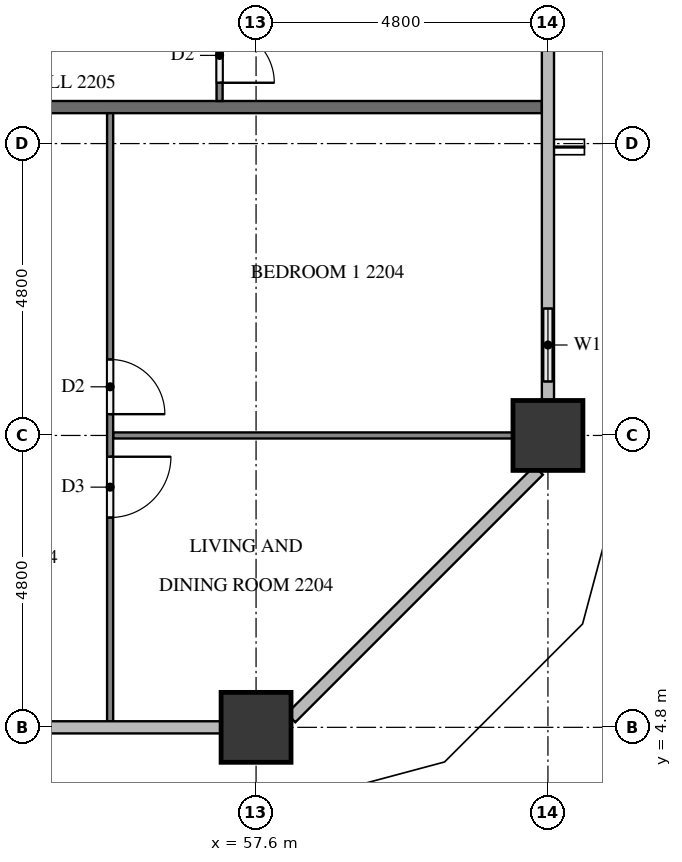
"""IFC4 building model, lengths in metres.
Left out: names, types, materials, properties, quantities, classifications, styles, units other than length and angle.
Written with IfcOpenShell. Run it as: python <this file> out.ifc"""

import sys

from ifc_helpers import new_model, si_unit, direction, frame, frame_2d, origin, origin_2d, place, context, subcontext, project, spatial, rectangle, extrude, element, fill, save


model = new_model("IFC4")
c1 = context("Model", 3, precision=1e-05, world=origin(), true_north=direction((0.0, 1.0)))
c2 = subcontext(c1, "Body", "Model", "MODEL_VIEW")
j1 = project(units=[si_unit("LENGTHUNIT", "METRE"), si_unit("PLANEANGLEUNIT", "RADIAN")], contexts=[c1])
p1 = place(None, origin())
s1 = spatial("IfcSite", under=j1, at=p1, CompositionType="ELEMENT")
p2 = place(p1, origin())
s2 = spatial("IfcBuilding", under=s1, at=p2, CompositionType="ELEMENT")
p3 = place(p2, frame((0.0, 0.0, 89.2)))
s3 = spatial("IfcBuildingStorey", under=s2, at=p3, CompositionType="ELEMENT", Elevation=89.2)
for number, where, z_axis, x_axis in (
    (1, (57.6, 4.8, 0.0), (0.0, 0.0, 1.0), (1.0, 0.0, 0.0)),
    (2, (62.4, 9.6, 0.0), (0.0, 0.0, 1.0), (1.0, 0.0, 0.0)),
):
    element("IfcColumn", number, at=place(p3, frame(where, z_axis=z_axis, x_axis=x_axis)), inside=s3, PredefinedType="COLUMN", context=c2, shape_type="SweptSolid", body=[
        extrude(rectangle(XDim=1.15, YDim=1.15, at=origin_2d()), origin(), (0.0, 0.0, 1.0), 3.2),
    ])
p4 = place(p3, frame((62.4, 10.175, 0.0), z_axis=(0.0, 0.0, 1.0), x_axis=(0.0, 1.0, 0.0)))
e3 = element("IfcWall", 3, at=p4, inside=s3, PredefinedType="SOLIDWALL", context=c2, shape_type="SweptSolid", body=[
    extrude(rectangle(XDim=1.825, YDim=0.15, at=frame_2d((0.913, 0.0))), origin(), (0.0, 0.0, 1.0), 3.2),
])
p5 = place(p4, frame((0.312, 0.0, 0.9)))
e4 = element("IfcOpeningElement", 4, at=p5, cuts=e3, PredefinedType="OPENING", context=c2, shape_type="SweptSolid", body=[
    extrude(rectangle(XDim=1.2, YDim=1.4, at=frame_2d((0.6, 0.7))), frame((0.0, 0.085, 0.0), z_axis=(0.0, -1.0, 0.0), x_axis=(1.0, 0.0, 0.0)), (0.0, 0.0, 1.0), 0.17),
])
p6 = place(p3, frame((52.5, 15.0, 0.0), z_axis=(0.0, 0.0, 1.0), x_axis=(1.0, 0.0, 0.0)))
e5 = element("IfcWall", 5, at=p6, inside=s3, PredefinedType="PARTITIONING", context=c2, shape_type="SweptSolid", body=[
    extrude(rectangle(XDim=9.8, YDim=0.2, at=frame_2d((4.9, 0.0))), origin(), (0.0, 0.0, 1.0), 3.2),
])
p7 = place(p3, frame((55.25, 9.6, 0.0), z_axis=(0.0, 0.0, 1.0), x_axis=(1.0, 0.0, 0.0)))
e6 = element("IfcWall", 6, at=p7, inside=s3, PredefinedType="PARTITIONING", context=c2, shape_type="SweptSolid", body=[
    extrude(rectangle(XDim=6.575, YDim=0.1, at=frame_2d((3.288, 0.0))), origin(), (0.0, 0.0, 1.0), 3.2),
])
p8 = place(p3, frame((55.2, 14.9, 0.0), z_axis=(0.0, 0.0, 1.0), x_axis=(0.0, -1.0, 0.0)))
e7 = element("IfcWall", 7, at=p8, inside=s3, PredefinedType="PARTITIONING", context=c2, shape_type="SweptSolid", body=[
    extrude(rectangle(XDim=10.0, YDim=0.1, at=frame_2d((5.0, 0.0))), origin(), (0.0, 0.0, 1.0), 3.2),
])
p9 = place(p8, frame((4.05, 0.0, 0.0)))
e8 = element("IfcOpeningElement", 8, at=p9, cuts=e7, PredefinedType="OPENING", context=c2, shape_type="SweptSolid", body=[
    extrude(rectangle(XDim=0.9, YDim=2.1, at=frame_2d((0.45, 1.05))), frame((0.0, 0.06, 0.0), z_axis=(0.0, -1.0, 0.0), x_axis=(1.0, 0.0, 0.0)), (0.0, 0.0, 1.0), 0.12),
])
p10 = place(p8, frame((5.65, 0.0, 0.0)))
e9 = element("IfcOpeningElement", 9, at=p10, cuts=e7, PredefinedType="OPENING", context=c2, shape_type="SweptSolid", body=[
    extrude(rectangle(XDim=1.0, YDim=2.1, at=frame_2d((0.5, 1.05))), frame((0.0, 0.06, 0.0), z_axis=(0.0, -1.0, 0.0), x_axis=(1.0, 0.0, 0.0)), (0.0, 0.0, 1.0), 0.12),
])
p11 = place(p3, frame((57.0, 28.7, 0.0), z_axis=(0.0, 0.0, 1.0), x_axis=(0.0, -1.0, 0.0)))
e10 = element("IfcWall", 10, at=p11, inside=s3, PredefinedType="PARTITIONING", context=c2, shape_type="SweptSolid", body=[
    extrude(rectangle(XDim=13.6, YDim=0.1, at=frame_2d((6.8, 0.0))), origin(), (0.0, 0.0, 1.0), 3.2),
])
p12 = place(p11, frame((12.4, 0.0, 0.0)))
e11 = element("IfcOpeningElement", 11, at=p12, cuts=e10, PredefinedType="OPENING", context=c2, shape_type="SweptSolid", body=[
    extrude(rectangle(XDim=0.9, YDim=2.1, at=frame_2d((0.45, 1.05))), frame((0.0, 0.06, 0.0), z_axis=(0.0, -1.0, 0.0), x_axis=(1.0, 0.0, 0.0)), (0.0, 0.0, 1.0), 0.12),
])
p13 = place(p11, frame((5.05, 0.0, 0.0)))
e12 = element("IfcOpeningElement", 12, at=p13, cuts=e10, PredefinedType="OPENING", context=c2, shape_type="SweptSolid", body=[
    extrude(rectangle(XDim=0.9, YDim=2.1, at=frame_2d((0.45, 1.05))), frame((0.0, 0.06, 0.0), z_axis=(0.0, -1.0, 0.0), x_axis=(1.0, 0.0, 0.0)), (0.0, 0.0, 1.0), 0.12),
])
p14 = place(p11, frame((3.35, 0.0, 0.0)))
e13 = element("IfcOpeningElement", 13, at=p14, cuts=e10, PredefinedType="OPENING", context=c2, shape_type="SweptSolid", body=[
    extrude(rectangle(XDim=1.0, YDim=2.1, at=frame_2d((0.5, 1.05))), frame((0.0, 0.06, 0.0), z_axis=(0.0, -1.0, 0.0), x_axis=(1.0, 0.0, 0.0)), (0.0, 0.0, 1.0), 0.12),
])
p15 = place(p5, origin())
e14 = element("IfcWindow", 14, at=p15, inside=s3, PartitioningType="SINGLE_PANEL", PredefinedType="WINDOW", context=c2, shape_type="SweptSolid", body=[
    extrude(rectangle(XDim=1.2, YDim=1.4, at=frame_2d((0.6, 0.7))), frame((0.0, 0.03, 0.0), z_axis=(0.0, -1.0, 0.0), x_axis=(1.0, 0.0, 0.0)), (0.0, 0.0, 1.0), 0.06),
])
fill(e4, e14)
p16 = place(p9, origin())
e15 = element("IfcDoor", 15, at=p16, inside=s3, OperationType="SINGLE_SWING_RIGHT", PredefinedType="DOOR", context=c2, shape_type="SweptSolid", body=[
    extrude(rectangle(XDim=0.9, YDim=2.1, at=frame_2d((0.45, 1.05))), frame((0.0, 0.025, 0.0), z_axis=(0.0, -1.0, 0.0), x_axis=(1.0, 0.0, 0.0)), (0.0, 0.0, 1.0), 0.05),
])
fill(e8, e15)
p17 = place(p10, origin())
e16 = element("IfcDoor", 16, at=p17, inside=s3, OperationType="SINGLE_SWING_LEFT", PredefinedType="DOOR", context=c2, shape_type="SweptSolid", body=[
    extrude(rectangle(XDim=1.0, YDim=2.1, at=frame_2d((0.5, 1.05))), frame((0.0, 0.025, 0.0), z_axis=(0.0, -1.0, 0.0), x_axis=(1.0, 0.0, 0.0)), (0.0, 0.0, 1.0), 0.05),
])
fill(e9, e16)
p18 = place(p12, origin())
e17 = element("IfcDoor", 17, at=p18, inside=s3, OperationType="SINGLE_SWING_RIGHT", PredefinedType="DOOR", context=c2, shape_type="SweptSolid", body=[
    extrude(rectangle(XDim=0.9, YDim=2.1, at=frame_2d((0.45, 1.05))), frame((0.0, 0.025, 0.0), z_axis=(0.0, -1.0, 0.0), x_axis=(1.0, 0.0, 0.0)), (0.0, 0.0, 1.0), 0.05),
])
fill(e11, e17)
save(model, sys.argv[1])
